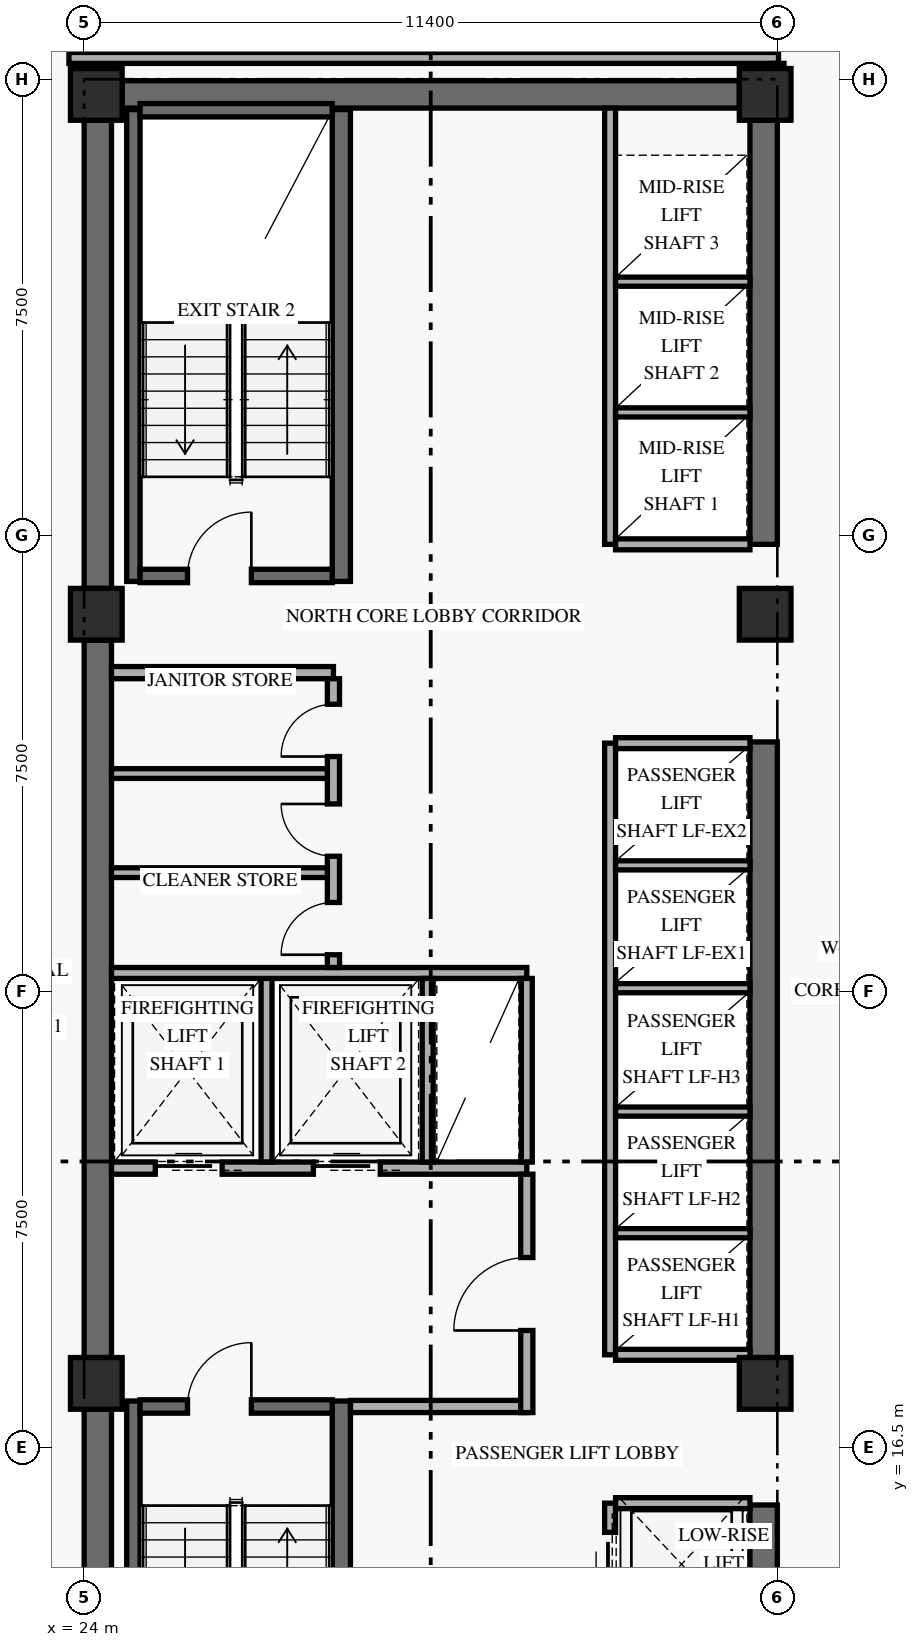
"""IFC4 building model, lengths in metres.
Left out: names, types, materials, properties, quantities, classifications, styles, units other than length and angle.
Written with IfcOpenShell. Run it as: python <this file> out.ifc"""

import sys

from ifc_helpers import new_model, si_unit, direction, frame, frame_2d, origin, origin_2d, place, context, subcontext, project, spatial, rectangle, extrude, element, fill, save


model = new_model("IFC4")
c1 = context("Model", 3, precision=1e-05, world=origin(), true_north=direction((0.0, 1.0)))
c2 = subcontext(c1, "Body", "Model", "MODEL_VIEW")
j1 = project(units=[si_unit("LENGTHUNIT", "METRE"), si_unit("PLANEANGLEUNIT", "RADIAN")], contexts=[c1])
p1 = place(None, origin())
s1 = spatial("IfcSite", under=j1, at=p1, CompositionType="ELEMENT")
p2 = place(p1, origin())
s2 = spatial("IfcBuilding", under=s1, at=p2, CompositionType="ELEMENT")
p3 = place(p2, frame((0.0, 0.0, 52.8)))
s3 = spatial("IfcBuildingStorey", under=s2, at=p3, CompositionType="ELEMENT", Elevation=52.8)
p4 = place(p3, frame((24.225, 9.675, 0.0), z_axis=(0.0, 0.0, 1.0), x_axis=(0.0, 1.0, 0.0)))
e1 = element("IfcWall", 1, at=p4, inside=s3, PredefinedType="SHEAR", context=c2, shape_type="SweptSolid", body=[
    extrude(rectangle(XDim=7.45, YDim=0.45, at=frame_2d((3.725, 0.0))), origin(), (0.0, 0.0, 1.0), 2.667),
])
p5 = place(p3, frame((24.225, 17.975, 0.0), z_axis=(0.0, 0.0, 1.0), x_axis=(0.0, 1.0, 0.0)))
e2 = element("IfcWall", 2, at=p5, inside=s3, PredefinedType="SHEAR", context=c2, shape_type="SweptSolid", body=[
    extrude(rectangle(XDim=11.8, YDim=0.45, at=frame_2d((5.9, 0.0))), origin(), (0.0, 0.0, 1.0), 2.667),
])
p6 = place(p3, frame((24.225, 30.625, 0.0), z_axis=(0.0, 0.0, 1.0), x_axis=(0.0, 1.0, 0.0)))
e3 = element("IfcWall", 3, at=p6, inside=s3, PredefinedType="SHEAR", context=c2, shape_type="SweptSolid", body=[
    extrude(rectangle(XDim=7.7, YDim=0.45, at=frame_2d((3.85, 0.0))), origin(), (0.0, 0.0, 1.0), 2.667),
])
p7 = place(p3, frame((35.175, 9.675, 0.0), z_axis=(0.0, 0.0, 1.0), x_axis=(0.0, 1.0, 0.0)))
e4 = element("IfcWall", 4, at=p7, inside=s3, PredefinedType="SHEAR", context=c2, shape_type="SweptSolid", body=[
    extrude(rectangle(XDim=5.875, YDim=0.45, at=frame_2d((2.938, 0.0))), origin(), (0.0, 0.0, 1.0), 2.667),
])
p8 = place(p3, frame((35.175, 17.975, 0.0), z_axis=(0.0, 0.0, 1.0), x_axis=(0.0, 1.0, 0.0)))
e5 = element("IfcWall", 5, at=p8, inside=s3, PredefinedType="SHEAR", context=c2, shape_type="SweptSolid", body=[
    extrude(rectangle(XDim=10.125, YDim=0.45, at=frame_2d((5.062, 0.0))), origin(), (0.0, 0.0, 1.0), 2.667),
])
p9 = place(p3, frame((35.175, 31.35, 0.0), z_axis=(0.0, 0.0, 1.0), x_axis=(0.0, 1.0, 0.0)))
e6 = element("IfcWall", 6, at=p9, inside=s3, PredefinedType="SHEAR", context=c2, shape_type="SweptSolid", body=[
    extrude(rectangle(XDim=6.975, YDim=0.45, at=frame_2d((3.487, 0.0))), origin(), (0.0, 0.0, 1.0), 2.667),
])
p10 = place(p3, frame((24.625, 38.75, 0.0), z_axis=(0.0, 0.0, 1.0), x_axis=(1.0, 0.0, 0.0)))
e7 = element("IfcWall", 7, at=p10, inside=s3, PredefinedType="SHEAR", context=c2, shape_type="SweptSolid", body=[
    extrude(rectangle(XDim=10.15, YDim=0.45, at=frame_2d((5.075, 0.0))), origin(), (0.0, 0.0, 1.0), 3.36),
])
p11 = place(p3, frame((24.81, 9.5, 0.0), z_axis=(0.0, 0.0, 1.0), x_axis=(0.0, 1.0, 0.0)))
e8 = element("IfcWall", 8, at=p11, inside=s3, PredefinedType="SHEAR", context=c2, shape_type="SweptSolid", body=[
    extrude(rectangle(XDim=7.76, YDim=0.22, at=frame_2d((3.88, 0.0))), origin(), (0.0, 0.0, 1.0), 3.36),
])
p12 = place(p3, frame((28.23, 9.5, 0.0), z_axis=(0.0, 0.0, 1.0), x_axis=(0.0, 1.0, 0.0)))
e9 = element("IfcWall", 9, at=p12, inside=s3, PredefinedType="SHEAR", context=c2, shape_type="SweptSolid", body=[
    extrude(rectangle(XDim=7.76, YDim=0.3, at=frame_2d((3.88, 0.0))), origin(), (0.0, 0.0, 1.0), 3.36),
])
p13 = place(p3, frame((24.92, 17.17, 0.0), z_axis=(0.0, 0.0, 1.0), x_axis=(1.0, 0.0, 0.0)))
e10 = element("IfcWall", 10, at=p13, inside=s3, PredefinedType="SHEAR", context=c2, shape_type="SweptSolid", body=[
    extrude(rectangle(XDim=3.16, YDim=0.22, at=frame_2d((1.58, 0.0))), origin(), (0.0, 0.0, 1.0), 3.36),
])
p14 = place(p13, frame((0.78, 0.0, 0.0)))
e11 = element("IfcOpeningElement", 11, at=p14, cuts=e10, PredefinedType="OPENING", context=c2, shape_type="SweptSolid", body=[
    extrude(rectangle(XDim=1.05, YDim=2.15, at=frame_2d((0.525, 1.075))), frame((0.0, 0.12, 0.0), z_axis=(0.0, -1.0, 0.0), x_axis=(1.0, 0.0, 0.0)), (0.0, 0.0, 1.0), 0.24),
])
p15 = place(p3, frame((24.81, 30.74, 0.0), z_axis=(0.0, 0.0, 1.0), x_axis=(0.0, 1.0, 0.0)))
e12 = element("IfcWall", 12, at=p15, inside=s3, PredefinedType="SHEAR", context=c2, shape_type="SweptSolid", body=[
    extrude(rectangle(XDim=7.76, YDim=0.22, at=frame_2d((3.88, 0.0))), origin(), (0.0, 0.0, 1.0), 3.36),
])
p16 = place(p3, frame((28.23, 30.74, 0.0), z_axis=(0.0, 0.0, 1.0), x_axis=(0.0, 1.0, 0.0)))
e13 = element("IfcWall", 13, at=p16, inside=s3, PredefinedType="SHEAR", context=c2, shape_type="SweptSolid", body=[
    extrude(rectangle(XDim=7.76, YDim=0.3, at=frame_2d((3.88, 0.0))), origin(), (0.0, 0.0, 1.0), 3.36),
])
p17 = place(p3, frame((24.92, 30.83, 0.0), z_axis=(0.0, 0.0, 1.0), x_axis=(1.0, 0.0, 0.0)))
e14 = element("IfcWall", 14, at=p17, inside=s3, PredefinedType="SHEAR", context=c2, shape_type="SweptSolid", body=[
    extrude(rectangle(XDim=3.16, YDim=0.22, at=frame_2d((1.58, 0.0))), origin(), (0.0, 0.0, 1.0), 3.36),
])
p18 = place(p17, frame((0.78, 0.0, 0.0)))
e15 = element("IfcOpeningElement", 15, at=p18, cuts=e14, PredefinedType="OPENING", context=c2, shape_type="SweptSolid", body=[
    extrude(rectangle(XDim=1.05, YDim=2.15, at=frame_2d((0.525, 1.075))), frame((0.0, 0.12, 0.0), z_axis=(0.0, -1.0, 0.0), x_axis=(1.0, 0.0, 0.0)), (0.0, 0.0, 1.0), 0.24),
])
p19 = place(p3, frame((24.92, 38.49, 0.0), z_axis=(0.0, 0.0, 1.0), x_axis=(1.0, 0.0, 0.0)))
e16 = element("IfcWall", 16, at=p19, inside=s3, PredefinedType="SHEAR", context=c2, shape_type="SweptSolid", body=[
    extrude(rectangle(XDim=3.16, YDim=0.22, at=frame_2d((1.58, 0.0))), origin(), (0.0, 0.0, 1.0), 3.36),
])
for number, where, z_axis, x_axis in (
    (17, (24.2, 17.55, 0.0), (0.0, 0.0, 1.0), (1.0, 0.0, 0.0)),
    (18, (24.2, 30.2, 0.0), (0.0, 0.0, 1.0), (1.0, 0.0, 0.0)),
    (19, (24.2, 38.75, 0.0), (0.0, 0.0, 1.0), (1.0, 0.0, 0.0)),
    (20, (35.2, 17.55, 0.0), (0.0, 0.0, 1.0), (1.0, 0.0, 0.0)),
    (21, (35.2, 30.2, 0.0), (0.0, 0.0, 1.0), (1.0, 0.0, 0.0)),
    (22, (35.2, 38.75, 0.0), (0.0, 0.0, 1.0), (1.0, 0.0, 0.0)),
):
    element("IfcColumn", number, at=place(p3, frame(where, z_axis=z_axis, x_axis=x_axis)), inside=s3, PredefinedType="COLUMN", context=c2, shape_type="SweptSolid", body=[
        extrude(rectangle(XDim=0.85, YDim=0.85, at=origin_2d()), origin(), (0.0, 0.0, 1.0), 3.6),
    ])
p20 = place(p3, frame((24.45, 21.09, 0.0), z_axis=(0.0, 0.0, 1.0), x_axis=(1.0, 0.0, 0.0)))
e23 = element("IfcWall", 23, at=p20, inside=s3, PredefinedType="STANDARD", context=c2, shape_type="SweptSolid", body=[
    extrude(rectangle(XDim=6.83, YDim=0.2, at=frame_2d((3.415, 0.0))), origin(), (0.0, 0.0, 1.0), 3.36),
])
p21 = place(p20, frame((0.72, 0.0, 0.0)))
e24 = element("IfcOpeningElement", 24, at=p21, cuts=e23, PredefinedType="OPENING", context=c2, shape_type="SweptSolid", body=[
    extrude(rectangle(XDim=1.1, YDim=2.2, at=frame_2d((0.55, 1.1))), frame((0.0, 0.11, 0.0), z_axis=(0.0, -1.0, 0.0), x_axis=(1.0, 0.0, 0.0)), (0.0, 0.0, 1.0), 0.22),
])
p22 = place(p20, frame((3.32, 0.0, 0.0)))
e25 = element("IfcOpeningElement", 25, at=p22, cuts=e23, PredefinedType="OPENING", context=c2, shape_type="SweptSolid", body=[
    extrude(rectangle(XDim=1.1, YDim=2.2, at=frame_2d((0.55, 1.1))), frame((0.0, 0.11, 0.0), z_axis=(0.0, -1.0, 0.0), x_axis=(1.0, 0.0, 0.0)), (0.0, 0.0, 1.0), 0.22),
])
p23 = place(p3, frame((28.38, 17.17, 0.0), z_axis=(0.0, 0.0, 1.0), x_axis=(1.0, 0.0, 0.0)))
e26 = element("IfcWall", 26, at=p23, inside=s3, PredefinedType="STANDARD", context=c2, shape_type="SweptSolid", body=[
    extrude(rectangle(XDim=2.9, YDim=0.2, at=frame_2d((1.45, 0.0))), origin(), (0.0, 0.0, 1.0), 3.36),
])
p24 = place(p3, frame((31.28, 17.07, 0.0), z_axis=(0.0, 0.0, 1.0), x_axis=(0.0, 1.0, 0.0)))
e27 = element("IfcWall", 27, at=p24, inside=s3, PredefinedType="STANDARD", context=c2, shape_type="SweptSolid", body=[
    extrude(rectangle(XDim=3.92, YDim=0.2, at=frame_2d((1.96, 0.0))), origin(), (0.0, 0.0, 1.0), 2.649),
])
p25 = place(p24, frame((1.35, 0.0, 0.0)))
e28 = element("IfcOpeningElement", 28, at=p25, cuts=e27, PredefinedType="OPENING", context=c2, shape_type="SweptSolid", body=[
    extrude(rectangle(XDim=1.2, YDim=2.15, at=frame_2d((0.6, 1.075))), frame((0.0, 0.11, 0.0), z_axis=(0.0, -1.0, 0.0), x_axis=(1.0, 0.0, 0.0)), (0.0, 0.0, 1.0), 0.22),
])
p26 = place(p3, frame((27.0, 21.19, 0.0), z_axis=(0.0, 0.0, 1.0), x_axis=(0.0, 1.0, 0.0)))
e29 = element("IfcWall", 29, at=p26, inside=s3, PredefinedType="STANDARD", context=c2, shape_type="SweptSolid", body=[
    extrude(rectangle(XDim=3.11, YDim=0.18, at=frame_2d((1.555, 0.0))), origin(), (0.0, 0.0, 1.0), 3.36),
])
p27 = place(p3, frame((24.45, 24.3, 0.0), z_axis=(0.0, 0.0, 1.0), x_axis=(1.0, 0.0, 0.0)))
e30 = element("IfcWall", 30, at=p27, inside=s3, PredefinedType="STANDARD", context=c2, shape_type="SweptSolid", body=[
    extrude(rectangle(XDim=6.83, YDim=0.18, at=frame_2d((3.415, 0.0))), origin(), (0.0, 0.0, 1.0), 3.36),
])
for number, where, z_axis, x_axis in (
    (31, (29.65, 21.19, 0.0), (0.0, 0.0, 1.0), (0.0, 1.0, 0.0)),
    (32, (31.28, 21.19, 0.0), (0.0, 0.0, 1.0), (0.0, 1.0, 0.0)),
):
    element("IfcWall", number, at=place(p3, frame(where, z_axis=z_axis, x_axis=x_axis)), inside=s3, PredefinedType="STANDARD", context=c2, shape_type="SweptSolid", body=[
        extrude(rectangle(XDim=3.02, YDim=0.18, at=frame_2d((1.51, 0.0))), origin(), (0.0, 0.0, 1.0), 3.36),
    ])
p28 = place(p3, frame((24.45, 29.24, 0.0), z_axis=(0.0, 0.0, 1.0), x_axis=(1.0, 0.0, 0.0)))
e33 = element("IfcWall", 33, at=p28, inside=s3, PredefinedType="STANDARD", context=c2, shape_type="SweptSolid", body=[
    extrude(rectangle(XDim=3.65, YDim=0.2, at=frame_2d((1.825, 0.0))), origin(), (0.0, 0.0, 1.0), 3.36),
])
p29 = place(p3, frame((28.1, 24.39, 0.0), z_axis=(0.0, 0.0, 1.0), x_axis=(0.0, 1.0, 0.0)))
e34 = element("IfcWall", 34, at=p29, inside=s3, PredefinedType="STANDARD", context=c2, shape_type="SweptSolid", body=[
    extrude(rectangle(XDim=4.75, YDim=0.2, at=frame_2d((2.375, 0.0))), origin(), (0.0, 0.0, 1.0), 3.36),
])
p30 = place(p29, frame((0.21, 0.0, 0.0)))
e35 = element("IfcOpeningElement", 35, at=p30, cuts=e34, PredefinedType="OPENING", context=c2, shape_type="SweptSolid", body=[
    extrude(rectangle(XDim=0.86, YDim=2.1, at=frame_2d((0.43, 1.05))), frame((0.0, 0.11, 0.0), z_axis=(0.0, -1.0, 0.0), x_axis=(1.0, 0.0, 0.0)), (0.0, 0.0, 1.0), 0.22),
])
p31 = place(p29, frame((1.83, 0.0, 0.0)))
e36 = element("IfcOpeningElement", 36, at=p31, cuts=e34, PredefinedType="OPENING", context=c2, shape_type="SweptSolid", body=[
    extrude(rectangle(XDim=0.86, YDim=2.1, at=frame_2d((0.43, 1.05))), frame((0.0, 0.11, 0.0), z_axis=(0.0, -1.0, 0.0), x_axis=(1.0, 0.0, 0.0)), (0.0, 0.0, 1.0), 0.22),
])
p32 = place(p29, frame((3.47, 0.0, 0.0)))
e37 = element("IfcOpeningElement", 37, at=p32, cuts=e34, PredefinedType="OPENING", context=c2, shape_type="SweptSolid", body=[
    extrude(rectangle(XDim=0.86, YDim=2.1, at=frame_2d((0.43, 1.05))), frame((0.0, 0.11, 0.0), z_axis=(0.0, -1.0, 0.0), x_axis=(1.0, 0.0, 0.0)), (0.0, 0.0, 1.0), 0.22),
])
for number, where, z_axis, x_axis in (
    (38, (24.45, 25.95, 0.0), (0.0, 0.0, 1.0), (1.0, 0.0, 0.0)),
    (39, (24.45, 27.58, 0.0), (0.0, 0.0, 1.0), (1.0, 0.0, 0.0)),
):
    element("IfcWall", number, at=place(p3, frame(where, z_axis=z_axis, x_axis=x_axis)), inside=s3, PredefinedType="PARTITIONING", context=c2, shape_type="SweptSolid", body=[
        extrude(rectangle(XDim=3.55, YDim=0.16, at=frame_2d((1.775, 0.0))), origin(), (0.0, 0.0, 1.0), 3.36),
    ])
p33 = place(p3, frame((32.65, 9.5, 0.0), z_axis=(0.0, 0.0, 1.0), x_axis=(0.0, 1.0, 0.0)))
e40 = element("IfcWall", 40, at=p33, inside=s3, PredefinedType="STANDARD", context=c2, shape_type="SweptSolid", body=[
    extrude(rectangle(XDim=6.08, YDim=0.18, at=frame_2d((3.04, 0.0))), origin(), (0.0, 0.0, 1.0), 3.36),
])
p34 = place(p33, frame((0.55, 0.0, 0.0)))
e41 = element("IfcOpeningElement", 41, at=p34, cuts=e40, PredefinedType="OPENING", context=c2, shape_type="SweptSolid", body=[
    extrude(rectangle(XDim=1.05, YDim=2.2, at=frame_2d((0.525, 1.1))), frame((0.0, 0.1, 0.0), z_axis=(0.0, -1.0, 0.0), x_axis=(1.0, 0.0, 0.0)), (0.0, 0.0, 1.0), 0.2),
])
p35 = place(p33, frame((2.55, 0.0, 0.0)))
e42 = element("IfcOpeningElement", 42, at=p35, cuts=e40, PredefinedType="OPENING", context=c2, shape_type="SweptSolid", body=[
    extrude(rectangle(XDim=1.05, YDim=2.2, at=frame_2d((0.525, 1.1))), frame((0.0, 0.1, 0.0), z_axis=(0.0, -1.0, 0.0), x_axis=(1.0, 0.0, 0.0)), (0.0, 0.0, 1.0), 0.2),
])
p36 = place(p33, frame((4.55, 0.0, 0.0)))
e43 = element("IfcOpeningElement", 43, at=p36, cuts=e40, PredefinedType="OPENING", context=c2, shape_type="SweptSolid", body=[
    extrude(rectangle(XDim=1.05, YDim=2.2, at=frame_2d((0.525, 1.1))), frame((0.0, 0.1, 0.0), z_axis=(0.0, -1.0, 0.0), x_axis=(1.0, 0.0, 0.0)), (0.0, 0.0, 1.0), 0.2),
])
p37 = place(p3, frame((32.74, 15.58, 0.0), z_axis=(0.0, 0.0, 1.0), x_axis=(1.0, 0.0, 0.0)))
e44 = element("IfcWall", 44, at=p37, inside=s3, PredefinedType="STANDARD", context=c2, shape_type="SweptSolid", body=[
    extrude(rectangle(XDim=2.21, YDim=0.18, at=frame_2d((1.105, 0.0))), origin(), (0.0, 0.0, 1.0), 3.36),
])
p38 = place(p3, frame((32.65, 18.02, 0.0), z_axis=(0.0, 0.0, 1.0), x_axis=(0.0, 1.0, 0.0)))
e45 = element("IfcWall", 45, at=p38, inside=s3, PredefinedType="STANDARD", context=c2, shape_type="SweptSolid", body=[
    extrude(rectangle(XDim=10.06, YDim=0.18, at=frame_2d((5.03, 0.0))), origin(), (0.0, 0.0, 1.0), 3.36),
])
for number, where, z_axis, x_axis in (
    (46, (32.74, 18.02, 0.0), (0.0, 0.0, 1.0), (1.0, 0.0, 0.0)),
    (47, (32.74, 28.08, 0.0), (0.0, 0.0, 1.0), (1.0, 0.0, 0.0)),
):
    element("IfcWall", number, at=place(p3, frame(where, z_axis=z_axis, x_axis=x_axis)), inside=s3, PredefinedType="STANDARD", context=c2, shape_type="SweptSolid", body=[
        extrude(rectangle(XDim=2.21, YDim=0.18, at=frame_2d((1.105, 0.0))), origin(), (0.0, 0.0, 1.0), 3.36),
    ])
for number, where, z_axis, x_axis in (
    (48, (32.74, 20.02, 0.0), (0.0, 0.0, 1.0), (1.0, 0.0, 0.0)),
    (49, (32.74, 22.02, 0.0), (0.0, 0.0, 1.0), (1.0, 0.0, 0.0)),
    (50, (32.74, 24.05, 0.0), (0.0, 0.0, 1.0), (1.0, 0.0, 0.0)),
    (51, (32.74, 26.07, 0.0), (0.0, 0.0, 1.0), (1.0, 0.0, 0.0)),
):
    element("IfcWall", number, at=place(p3, frame(where, z_axis=z_axis, x_axis=x_axis)), inside=s3, PredefinedType="STANDARD", context=c2, shape_type="SweptSolid", body=[
        extrude(rectangle(XDim=2.21, YDim=0.15, at=frame_2d((1.105, 0.0))), origin(), (0.0, 0.0, 1.0), 3.36),
    ])
p39 = place(p3, frame((32.65, 31.35, 0.0), z_axis=(0.0, 0.0, 1.0), x_axis=(0.0, 1.0, 0.0)))
e52 = element("IfcWall", 52, at=p39, inside=s3, PredefinedType="STANDARD", context=c2, shape_type="SweptSolid", body=[
    extrude(rectangle(XDim=7.175, YDim=0.18, at=frame_2d((3.587, 0.0))), origin(), (0.0, 0.0, 1.0), 3.36),
])
p40 = place(p3, frame((32.74, 31.35, 0.0), z_axis=(0.0, 0.0, 1.0), x_axis=(1.0, 0.0, 0.0)))
e53 = element("IfcWall", 53, at=p40, inside=s3, PredefinedType="STANDARD", context=c2, shape_type="SweptSolid", body=[
    extrude(rectangle(XDim=2.21, YDim=0.18, at=frame_2d((1.105, 0.0))), origin(), (0.0, 0.0, 1.0), 3.36),
])
for number, where, z_axis, x_axis in (
    (54, (32.74, 33.52, 0.0), (0.0, 0.0, 1.0), (1.0, 0.0, 0.0)),
    (55, (32.74, 35.67, 0.0), (0.0, 0.0, 1.0), (1.0, 0.0, 0.0)),
):
    element("IfcWall", number, at=place(p3, frame(where, z_axis=z_axis, x_axis=x_axis)), inside=s3, PredefinedType="STANDARD", context=c2, shape_type="SweptSolid", body=[
        extrude(rectangle(XDim=2.21, YDim=0.15, at=frame_2d((1.105, 0.0))), origin(), (0.0, 0.0, 1.0), 3.36),
    ])
p41 = place(p3, frame((23.75, 39.35, 0.0), z_axis=(0.0, 0.0, 1.0), x_axis=(1.0, 0.0, 0.0)))
e56 = element("IfcWall", 56, at=p41, inside=s3, PredefinedType="STANDARD", context=c2, shape_type="SweptSolid", body=[
    extrude(rectangle(XDim=11.67, YDim=0.18, at=frame_2d((5.835, 0.0))), origin(), (0.0, 0.0, 1.0), 2.649),
])
p42 = place(p3, frame((35.42, 38.75, 0.0), z_axis=(0.0, 0.0, 1.0), x_axis=(0.0, 1.0, 0.0)))
e57 = element("IfcWall", 57, at=p42, inside=s3, PredefinedType="STANDARD", context=c2, shape_type="SweptSolid", body=[
    extrude(rectangle(XDim=0.51, YDim=0.18, at=frame_2d((0.255, 0.0))), origin(), (0.0, 0.0, 1.0), 3.36),
])
p43 = place(p14, frame((1.05, 0.0, 0.0), z_axis=(0.0, 0.0, 1.0), x_axis=(-1.0, 0.0, 0.0)))
e58 = element("IfcDoor", 58, at=p43, inside=s3, OperationType="SINGLE_SWING_LEFT", PredefinedType="DOOR", context=c2, shape_type="SweptSolid", body=[
    extrude(rectangle(XDim=1.05, YDim=2.15, at=frame_2d((0.525, 1.075))), frame((0.0, 0.025, 0.0), z_axis=(0.0, -1.0, 0.0), x_axis=(1.0, 0.0, 0.0)), (0.0, 0.0, 1.0), 0.05),
])
fill(e11, e58)
p44 = place(p18, origin())
e59 = element("IfcDoor", 59, at=p44, inside=s3, OperationType="SINGLE_SWING_RIGHT", PredefinedType="DOOR", context=c2, shape_type="SweptSolid", body=[
    extrude(rectangle(XDim=1.05, YDim=2.15, at=frame_2d((0.525, 1.075))), frame((0.0, 0.025, 0.0), z_axis=(0.0, -1.0, 0.0), x_axis=(1.0, 0.0, 0.0)), (0.0, 0.0, 1.0), 0.05),
])
fill(e15, e59)
p45 = place(p21, origin())
e60 = element("IfcDoor", 60, at=p45, inside=s3, OperationType="SLIDING_TO_LEFT", PredefinedType="DOOR", context=c2, shape_type="SweptSolid", body=[
    extrude(rectangle(XDim=1.1, YDim=2.2, at=frame_2d((0.55, 1.1))), frame((0.0, 0.025, 0.0), z_axis=(0.0, -1.0, 0.0), x_axis=(1.0, 0.0, 0.0)), (0.0, 0.0, 1.0), 0.05),
])
fill(e24, e60)
p46 = place(p22, origin())
e61 = element("IfcDoor", 61, at=p46, inside=s3, OperationType="SLIDING_TO_LEFT", PredefinedType="DOOR", context=c2, shape_type="SweptSolid", body=[
    extrude(rectangle(XDim=1.1, YDim=2.2, at=frame_2d((0.55, 1.1))), frame((0.0, 0.025, 0.0), z_axis=(0.0, -1.0, 0.0), x_axis=(1.0, 0.0, 0.0)), (0.0, 0.0, 1.0), 0.05),
])
fill(e25, e61)
p47 = place(p25, origin())
e62 = element("IfcDoor", 62, at=p47, inside=s3, OperationType="SINGLE_SWING_LEFT", PredefinedType="DOOR", context=c2, shape_type="SweptSolid", body=[
    extrude(rectangle(XDim=1.2, YDim=2.15, at=frame_2d((0.6, 1.075))), frame((0.0, 0.025, 0.0), z_axis=(0.0, -1.0, 0.0), x_axis=(1.0, 0.0, 0.0)), (0.0, 0.0, 1.0), 0.05),
])
fill(e28, e62)
p48 = place(p30, origin())
e63 = element("IfcDoor", 63, at=p48, inside=s3, OperationType="SINGLE_SWING_LEFT", PredefinedType="DOOR", context=c2, shape_type="SweptSolid", body=[
    extrude(rectangle(XDim=0.86, YDim=2.1, at=frame_2d((0.43, 1.05))), frame((0.0, 0.025, 0.0), z_axis=(0.0, -1.0, 0.0), x_axis=(1.0, 0.0, 0.0)), (0.0, 0.0, 1.0), 0.05),
])
fill(e35, e63)
p49 = place(p31, origin())
e64 = element("IfcDoor", 64, at=p49, inside=s3, OperationType="SINGLE_SWING_RIGHT", PredefinedType="DOOR", context=c2, shape_type="SweptSolid", body=[
    extrude(rectangle(XDim=0.86, YDim=2.1, at=frame_2d((0.43, 1.05))), frame((0.0, 0.025, 0.0), z_axis=(0.0, -1.0, 0.0), x_axis=(1.0, 0.0, 0.0)), (0.0, 0.0, 1.0), 0.05),
])
fill(e36, e64)
p50 = place(p32, origin())
e65 = element("IfcDoor", 65, at=p50, inside=s3, OperationType="SINGLE_SWING_LEFT", PredefinedType="DOOR", context=c2, shape_type="SweptSolid", body=[
    extrude(rectangle(XDim=0.86, YDim=2.1, at=frame_2d((0.43, 1.05))), frame((0.0, 0.025, 0.0), z_axis=(0.0, -1.0, 0.0), x_axis=(1.0, 0.0, 0.0)), (0.0, 0.0, 1.0), 0.05),
])
fill(e37, e65)
p51 = place(p36, origin())
e66 = element("IfcDoor", 66, at=p51, inside=s3, OperationType="SLIDING_TO_LEFT", PredefinedType="DOOR", context=c2, shape_type="SweptSolid", body=[
    extrude(rectangle(XDim=1.05, YDim=2.2, at=frame_2d((0.525, 1.1))), frame((0.0, 0.025, 0.0), z_axis=(0.0, -1.0, 0.0), x_axis=(1.0, 0.0, 0.0)), (0.0, 0.0, 1.0), 0.05),
])
fill(e43, e66)
save(model, sys.argv[1])
